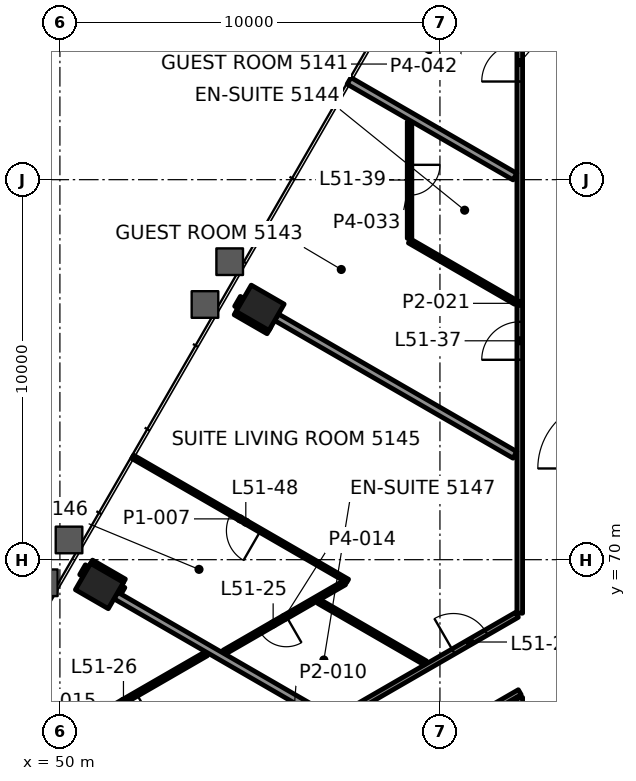
"""IFC4 building model, lengths in metres.
Left out: names, types, materials, properties, quantities, classifications, styles, units other than length and angle.
Written with IfcOpenShell. Run it as: python <this file> out.ifc"""

import sys

from ifc_helpers import new_model, si_unit, direction, frame, frame_2d, origin, origin_2d, place, context, subcontext, project, spatial, rectangle, hollow_rectangle, extrude, element, fill, save


model = new_model("IFC4")
c1 = context("Model", 3, precision=1e-05, world=origin(), true_north=direction((0.0, 1.0)))
c2 = subcontext(c1, "Body", "Model", "MODEL_VIEW")
j1 = project(units=[si_unit("LENGTHUNIT", "METRE"), si_unit("PLANEANGLEUNIT", "RADIAN")], contexts=[c1])
p1 = place(None, origin())
s1 = spatial("IfcSite", under=j1, at=p1, CompositionType="ELEMENT")
p2 = place(p1, origin())
s2 = spatial("IfcBuilding", under=s1, at=p2, CompositionType="ELEMENT")
p3 = place(p2, frame((0.0, 0.0, 218.2)))
s3 = spatial("IfcBuildingStorey", under=s2, at=p3, CompositionType="ELEMENT", Elevation=218.2)
for number, where, z_axis, x_axis in (
    (1, (55.268, 76.628, -0.0), (0.0, 0.0, 1.0), (-0.5, -0.866, 0.0)),
    (2, (51.04, 69.306, -0.0), (0.0, 0.0, 1.0), (-0.5, -0.866, 0.0)),
):
    element("IfcColumn", number, at=place(p3, frame(where, z_axis=z_axis, x_axis=x_axis)), inside=s3, PredefinedType="COLUMN", context=c2, shape_type="SweptSolid", body=[
        extrude(hollow_rectangle(XDim=0.8, YDim=1.0, WallThickness=0.05, at=origin_2d()), origin(), (0.0, 0.0, 1.0), 3.9),
    ])
p4 = place(p3, frame((62.1, 66.513, 0.0), z_axis=(0.0, 0.0, 1.0), x_axis=(-0.866025886419, -0.499999164051, 0.0)))
e3 = element("IfcWall", 3, at=p4, inside=s3, PredefinedType="PARTITIONING", context=c2, shape_type="SweptSolid", body=[
    extrude(rectangle(XDim=12.754, YDim=0.15, at=frame_2d((6.377, 0.0))), origin(), (0.0, 0.0, 1.0), 2.947),
])
p5 = place(p4, frame((0.587, 0.0, 0.0)))
e4 = element("IfcOpeningElement", 4, at=p5, cuts=e3, PredefinedType="OPENING", context=c2, shape_type="SweptSolid", body=[
    extrude(rectangle(XDim=1.0, YDim=2.1, at=frame_2d((0.5, 1.05))), frame((0.0, 0.085, 0.0), z_axis=(0.0, -1.0, 0.0), x_axis=(1.0, 0.0, 0.0)), (0.0, 0.0, 1.0), 0.17),
])
p6 = place(p4, frame((7.742, 0.0, 0.0)))
e5 = element("IfcOpeningElement", 5, at=p6, cuts=e3, PredefinedType="OPENING", context=c2, shape_type="SweptSolid", body=[
    extrude(rectangle(XDim=1.0, YDim=2.1, at=frame_2d((0.5, 1.05))), frame((0.0, 0.085, 0.0), z_axis=(0.0, -1.0, 0.0), x_axis=(1.0, 0.0, 0.0)), (0.0, 0.0, 1.0), 0.17),
])
p7 = place(p3, frame((50.155, 61.695, 0.0), z_axis=(0.0, 0.0, 1.0), x_axis=(0.8660236305, 0.500003071406, 0.0)))
e6 = element("IfcWall", 6, at=p7, inside=s3, PredefinedType="PARTITIONING", context=c2, shape_type="SweptSolid", body=[
    extrude(rectangle(XDim=13.707, YDim=0.15, at=frame_2d((6.853, 0.0))), origin(), (0.0, 0.0, 1.0), 3.1),
])
p8 = place(p7, frame((1.736, 0.0, 0.0)))
e7 = element("IfcOpeningElement", 7, at=p8, cuts=e6, PredefinedType="OPENING", context=c2, shape_type="SweptSolid", body=[
    extrude(rectangle(XDim=1.0, YDim=2.1, at=frame_2d((0.5, 1.05))), frame((0.0, 0.085, 0.0), z_axis=(0.0, -1.0, 0.0), x_axis=(1.0, 0.0, 0.0)), (0.0, 0.0, 1.0), 0.17),
])
p9 = place(p7, frame((11.777, 0.0, 0.0)))
e8 = element("IfcOpeningElement", 8, at=p9, cuts=e6, PredefinedType="OPENING", context=c2, shape_type="SweptSolid", body=[
    extrude(rectangle(XDim=1.0, YDim=2.1, at=frame_2d((0.5, 1.05))), frame((0.0, 0.085, 0.0), z_axis=(0.0, -1.0, 0.0), x_axis=(1.0, 0.0, 0.0)), (0.0, 0.0, 1.0), 0.17),
])
p10 = place(p3, frame((57.486, 69.392, 0.0), z_axis=(0.0, 0.0, 1.0), x_axis=(-0.866029747927, -0.499992475648, 0.0)))
e9 = element("IfcWall", 9, at=p10, inside=s3, PredefinedType="PARTITIONING", context=c2, shape_type="SweptSolid", body=[
    extrude(rectangle(XDim=3.652, YDim=0.12, at=frame_2d((1.826, 0.0))), origin(), (0.0, 0.0, 1.0), 3.1),
])
p11 = place(p10, frame((1.765, 0.0, 0.0)))
e10 = element("IfcOpeningElement", 10, at=p11, cuts=e9, PredefinedType="OPENING", context=c2, shape_type="SweptSolid", body=[
    extrude(rectangle(XDim=0.8, YDim=2.1, at=frame_2d((0.4, 1.05))), frame((0.0, 0.07, 0.0), z_axis=(0.0, -1.0, 0.0), x_axis=(1.0, 0.0, 0.0)), (0.0, 0.0, 1.0), 0.14),
])
p12 = place(p3, frame((53.854, 67.526, 0.0), z_axis=(0.0, 0.0, 1.0), x_axis=(-0.866025012717, -0.500000677347, 0.0)))
e11 = element("IfcWall", 11, at=p12, inside=s3, PredefinedType="PARTITIONING", context=c2, shape_type="SweptSolid", body=[
    extrude(rectangle(XDim=5.039, YDim=0.12, at=frame_2d((2.519, 0.0))), origin(), (0.0, 0.0, 1.0), 3.1),
])
p13 = place(p12, frame((2.119, 0.0, 0.0)))
e12 = element("IfcOpeningElement", 12, at=p13, cuts=e11, PredefinedType="OPENING", context=c2, shape_type="SweptSolid", body=[
    extrude(rectangle(XDim=0.8, YDim=2.1, at=frame_2d((0.4, 1.05))), frame((0.0, 0.07, 0.0), z_axis=(0.0, -1.0, 0.0), x_axis=(1.0, 0.0, 0.0)), (0.0, 0.0, 1.0), 0.14),
])
p14 = place(p3, frame((51.523, 69.143, 0.0), z_axis=(0.0, 0.0, 1.0), x_axis=(0.500359323436, 0.865817848887, 0.0)))
e13 = element("IfcWall", 13, at=p14, inside=s3, PredefinedType="PARTITIONING", context=c2, shape_type="SweptSolid", body=[
    extrude(rectangle(XDim=0.199, YDim=0.2, at=frame_2d((0.1, 0.0))), origin(), (0.0, 0.0, 1.0), 3.1),
])
p15 = place(p3, frame((50.607, 69.556, 0.0), z_axis=(0.0, 0.0, 1.0), x_axis=(0.49965177357, 0.866226359082, 0.0)))
e14 = element("IfcWall", 14, at=p15, inside=s3, PredefinedType="PARTITIONING", context=c2, shape_type="SweptSolid", body=[
    extrude(rectangle(XDim=0.299, YDim=0.2, at=frame_2d((0.149, 0.0))), origin(), (0.0, 0.0, 1.0), 3.1),
])
p16 = place(p3, frame((54.685, 76.619, 0.0), z_axis=(0.0, 0.0, 1.0), x_axis=(0.499816412211, 0.866131372301, 0.0)))
e15 = element("IfcWall", 15, at=p16, inside=s3, PredefinedType="PARTITIONING", context=c2, shape_type="SweptSolid", body=[
    extrude(rectangle(XDim=0.3, YDim=0.2, at=frame_2d((0.15, 0.0))), origin(), (0.0, 0.0, 1.0), 3.1),
])
p17 = place(p3, frame((62.1, 65.176, 0.0), z_axis=(0.0, 0.0, 1.0), x_axis=(0.0, 1.0, 0.0)))
e16 = element("IfcWall", 16, at=p17, inside=s3, PredefinedType="PARTITIONING", context=c2, shape_type="SweptSolid", body=[
    extrude(rectangle(XDim=1.201, YDim=0.15, at=frame_2d((0.6, 0.0))), origin(), (0.0, 0.0, 1.0), 2.947),
])
p18 = place(p3, frame((62.1, 68.591, 0.0), z_axis=(0.0, 0.0, 1.0), x_axis=(0.0, 1.0, 0.0)))
e17 = element("IfcWall", 17, at=p18, inside=s3, PredefinedType="PARTITIONING", context=c2, shape_type="SweptSolid", body=[
    extrude(rectangle(XDim=16.309, YDim=0.15, at=frame_2d((8.154, 0.0))), origin(), (0.0, 0.0, 1.0), 3.1),
])
p19 = place(p18, frame((6.668, 0.0, 0.0)))
e18 = element("IfcOpeningElement", 18, at=p19, cuts=e17, PredefinedType="OPENING", context=c2, shape_type="SweptSolid", body=[
    extrude(rectangle(XDim=1.0, YDim=2.1, at=frame_2d((0.5, 1.05))), frame((0.0, 0.085, 0.0), z_axis=(0.0, -1.0, 0.0), x_axis=(1.0, 0.0, 0.0)), (0.0, 0.0, 1.0), 0.17),
])
p20 = place(p18, frame((13.991, 0.0, 0.0)))
e19 = element("IfcOpeningElement", 19, at=p20, cuts=e17, PredefinedType="OPENING", context=c2, shape_type="SweptSolid", body=[
    extrude(rectangle(XDim=1.0, YDim=2.1, at=frame_2d((0.5, 1.05))), frame((0.0, 0.085, 0.0), z_axis=(0.0, -1.0, 0.0), x_axis=(1.0, 0.0, 0.0)), (0.0, 0.0, 1.0), 0.17),
])
p21 = place(p3, frame((59.2, 81.526, 0.0), z_axis=(0.0, 0.0, 1.0), x_axis=(0.0, -1.0, 0.0)))
e20 = element("IfcWall", 20, at=p21, inside=s3, PredefinedType="PARTITIONING", context=c2, shape_type="SweptSolid", body=[
    extrude(rectangle(XDim=3.07, YDim=0.12, at=frame_2d((1.535, 0.0))), origin(), (0.0, 0.0, 1.0), 3.1),
])
p22 = place(p21, frame((1.135, 0.0, 0.0)))
e21 = element("IfcOpeningElement", 21, at=p22, cuts=e20, PredefinedType="OPENING", context=c2, shape_type="SweptSolid", body=[
    extrude(rectangle(XDim=0.8, YDim=2.1, at=frame_2d((0.4, 1.05))), frame((0.0, 0.07, 0.0), z_axis=(0.0, -1.0, 0.0), x_axis=(1.0, 0.0, 0.0)), (0.0, 0.0, 1.0), 0.14),
])
p23 = place(p3, frame((61.973, 80.08, 0.0), z_axis=(0.0, 0.0, 1.0), x_axis=(-0.866017018378, 0.500014523669, 0.0)))
e22 = element("IfcWall", 22, at=p23, inside=s3, PredefinedType="PARTITIONING", context=c2, shape_type="SweptSolid", body=[
    extrude(rectangle(XDim=5.041, YDim=0.2, at=frame_2d((2.521, 0.0))), origin(), (0.0, 0.0, 1.0), 3.022),
])
p24 = place(p3, frame((61.99, 76.775, 0.0), z_axis=(0.0, 0.0, 1.0), x_axis=(-0.866010186656, 0.500026355914, 0.0)))
e23 = element("IfcWall", 23, at=p24, inside=s3, PredefinedType="PARTITIONING", context=c2, shape_type="SweptSolid", body=[
    extrude(rectangle(XDim=3.222, YDim=0.12, at=frame_2d((1.611, 0.0))), origin(), (0.0, 0.0, 1.0), 3.1),
])
p25 = place(p3, frame((61.973, 72.757, 0.0), z_axis=(0.0, 0.0, 1.0), x_axis=(-0.866027278279, 0.499996753267, 0.0)))
e24 = element("IfcWall", 24, at=p25, inside=s3, PredefinedType="PARTITIONING", context=c2, shape_type="SweptSolid", body=[
    extrude(rectangle(XDim=7.242, YDim=0.2, at=frame_2d((3.621, 0.0))), origin(), (0.0, 0.0, 1.0), 3.1),
])
p26 = place(p3, frame((55.501, 76.032, 0.0), z_axis=(0.0, 0.0, 1.0), x_axis=(-0.866010750942, 0.50002537861, 0.0)))
e25 = element("IfcWall", 25, at=p26, inside=s3, PredefinedType="PARTITIONING", context=c2, shape_type="SweptSolid", body=[
    extrude(rectangle(XDim=1.0, YDim=0.2, at=frame_2d((0.5, 0.0))), origin(), (0.0, 0.0, 1.0), 3.022),
])
p27 = place(p3, frame((57.571, 69.441, 0.0), z_axis=(0.0, 0.0, 1.0), x_axis=(-0.866026229868, 0.499998569178, 0.0)))
e26 = element("IfcWall", 26, at=p27, inside=s3, PredefinedType="PARTITIONING", context=c2, shape_type="SweptSolid", body=[
    extrude(rectangle(XDim=6.531, YDim=0.1, at=frame_2d((3.266, 0.0))), origin(), (0.0, 0.0, 1.0), 3.022),
])
p28 = place(p27, frame((2.644, 0.0, 0.0)))
e27 = element("IfcOpeningElement", 27, at=p28, cuts=e26, PredefinedType="OPENING", context=c2, shape_type="SweptSolid", body=[
    extrude(rectangle(XDim=0.9, YDim=2.1, at=frame_2d((0.45, 1.05))), frame((0.0, 0.06, 0.0), z_axis=(0.0, -1.0, 0.0), x_axis=(1.0, 0.0, 0.0)), (0.0, 0.0, 1.0), 0.12),
])
p29 = place(p3, frame((59.615, 67.283, 0.0), z_axis=(0.0, 0.0, 1.0), x_axis=(-0.866000447062, 0.500043223821, 0.0)))
e28 = element("IfcWall", 28, at=p29, inside=s3, PredefinedType="PARTITIONING", context=c2, shape_type="SweptSolid", body=[
    extrude(rectangle(XDim=3.228, YDim=0.12, at=frame_2d((1.614, 0.0))), origin(), (0.0, 0.0, 1.0), 3.1),
])
p30 = place(p3, frame((51.673, 69.403, 0.0), z_axis=(0.0, 0.0, 1.0), x_axis=(-0.866039090965, 0.499976292358, 0.0)))
e29 = element("IfcWall", 29, at=p30, inside=s3, PredefinedType="PARTITIONING", context=c2, shape_type="SweptSolid", body=[
    extrude(rectangle(XDim=0.999, YDim=0.2, at=frame_2d((0.5, 0.0))), origin(), (0.0, 0.0, 1.0), 3.022),
])
p31 = place(p3, frame((57.062, 65.83, 0.0), z_axis=(0.0, 0.0, 1.0), x_axis=(-0.866041300655, 0.499972464802, 0.0)))
e30 = element("IfcWall", 30, at=p31, inside=s3, PredefinedType="PARTITIONING", context=c2, shape_type="SweptSolid", body=[
    extrude(rectangle(XDim=6.452, YDim=0.2, at=frame_2d((3.226, 0.0))), origin(), (0.0, 0.0, 1.0), 3.1),
])
p32 = place(p9, origin())
e31 = element("IfcDoor", 31, at=p32, inside=s3, OperationType="SINGLE_SWING_RIGHT", PredefinedType="DOOR", context=c2, shape_type="SweptSolid", body=[
    extrude(rectangle(XDim=1.0, YDim=2.1, at=frame_2d((0.5, 1.05))), frame((0.0, 0.025, 0.0), z_axis=(0.0, -1.0, 0.0), x_axis=(1.0, 0.0, 0.0)), (0.0, 0.0, 1.0), 0.05),
])
fill(e8, e31)
p33 = place(p11, origin())
e32 = element("IfcDoor", 32, at=p33, inside=s3, OperationType="SINGLE_SWING_LEFT", PredefinedType="DOOR", context=c2, shape_type="SweptSolid", body=[
    extrude(rectangle(XDim=0.8, YDim=2.1, at=frame_2d((0.4, 1.05))), frame((0.0, 0.025, 0.0), z_axis=(0.0, -1.0, 0.0), x_axis=(1.0, 0.0, 0.0)), (0.0, 0.0, 1.0), 0.05),
])
fill(e10, e32)
p34 = place(p13, origin())
e33 = element("IfcDoor", 33, at=p34, inside=s3, OperationType="SINGLE_SWING_LEFT", PredefinedType="DOOR", context=c2, shape_type="SweptSolid", body=[
    extrude(rectangle(XDim=0.8, YDim=2.1, at=frame_2d((0.4, 1.05))), frame((0.0, 0.025, 0.0), z_axis=(0.0, -1.0, 0.0), x_axis=(1.0, 0.0, 0.0)), (0.0, 0.0, 1.0), 0.05),
])
fill(e12, e33)
p35 = place(p19, origin())
e34 = element("IfcDoor", 34, at=p35, inside=s3, OperationType="SINGLE_SWING_RIGHT", PredefinedType="DOOR", context=c2, shape_type="SweptSolid", body=[
    extrude(rectangle(XDim=1.0, YDim=2.1, at=frame_2d((0.5, 1.05))), frame((0.0, 0.025, 0.0), z_axis=(0.0, -1.0, 0.0), x_axis=(1.0, 0.0, 0.0)), (0.0, 0.0, 1.0), 0.05),
])
fill(e18, e34)
p36 = place(p20, origin())
e35 = element("IfcDoor", 35, at=p36, inside=s3, OperationType="SINGLE_SWING_RIGHT", PredefinedType="DOOR", context=c2, shape_type="SweptSolid", body=[
    extrude(rectangle(XDim=1.0, YDim=2.1, at=frame_2d((0.5, 1.05))), frame((0.0, 0.025, 0.0), z_axis=(0.0, -1.0, 0.0), x_axis=(1.0, 0.0, 0.0)), (0.0, 0.0, 1.0), 0.05),
])
fill(e19, e35)
p37 = place(p22, origin())
e36 = element("IfcDoor", 36, at=p37, inside=s3, OperationType="SINGLE_SWING_RIGHT", PredefinedType="DOOR", context=c2, shape_type="SweptSolid", body=[
    extrude(rectangle(XDim=0.8, YDim=2.1, at=frame_2d((0.4, 1.05))), frame((0.0, 0.025, 0.0), z_axis=(0.0, -1.0, 0.0), x_axis=(1.0, 0.0, 0.0)), (0.0, 0.0, 1.0), 0.05),
])
fill(e21, e36)
p38 = place(p28, origin())
e37 = element("IfcDoor", 37, at=p38, inside=s3, OperationType="SINGLE_SWING_LEFT", PredefinedType="DOOR", context=c2, shape_type="SweptSolid", body=[
    extrude(rectangle(XDim=0.9, YDim=2.1, at=frame_2d((0.45, 1.05))), frame((0.0, 0.025, 0.0), z_axis=(0.0, -1.0, 0.0), x_axis=(1.0, 0.0, 0.0)), (0.0, 0.0, 1.0), 0.05),
])
fill(e27, e37)
p39 = place(p3, origin())
p40 = place(p39, frame((52.985, 74.624, 0.15), z_axis=(0.0, 0.0, 1.0), x_axis=(-0.5, -0.866025, 0.0)))
p41 = place(p40, origin())
e38 = element("IfcWindow", 38, at=p41, inside=s3, PartitioningType="SINGLE_PANEL", PredefinedType="WINDOW", context=c2, shape_type="SweptSolid", body=[
    extrude(rectangle(XDim=2.743, YDim=3.55, at=frame_2d((1.372, 1.775))), frame((0.0, 0.03, 0.0), z_axis=(0.0, -1.0, 0.0), x_axis=(1.0, 0.0, 0.0)), (0.0, 0.0, 1.0), 0.06),
])
save(model, sys.argv[1])
